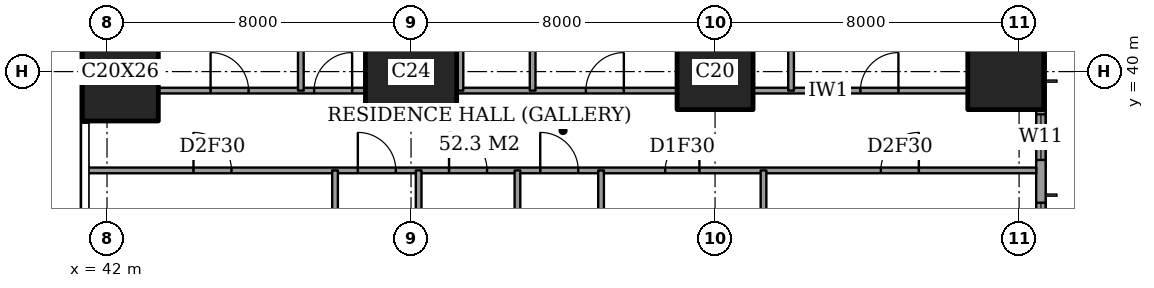
"""IFC4 building model, lengths in metres.
Left out: names, types, materials, properties, quantities, classifications, styles, units other than length and angle.
Written with IfcOpenShell. Run it as: python <this file> out.ifc"""

import sys

from ifc_helpers import new_model, si_unit, direction, frame, frame_2d, origin, origin_2d, place, context, subcontext, project, spatial, rectangle, extrude, element, fill, save


model = new_model("IFC4")
c1 = context("Model", 3, precision=1e-05, world=origin(), true_north=direction((0.0, 1.0)))
c2 = subcontext(c1, "Body", "Model", "MODEL_VIEW")
j1 = project(units=[si_unit("LENGTHUNIT", "METRE"), si_unit("PLANEANGLEUNIT", "RADIAN")], contexts=[c1])
p1 = place(None, origin())
s1 = spatial("IfcSite", under=j1, at=p1, CompositionType="ELEMENT")
p2 = place(p1, origin())
s2 = spatial("IfcBuilding", under=s1, at=p2, CompositionType="ELEMENT")
p3 = place(p2, frame((0.0, 0.0, 99.8)))
s3 = spatial("IfcBuildingStorey", under=s2, at=p3, CompositionType="ELEMENT", Elevation=99.8)
p4 = place(p3, frame((42.35, 40.0, 0.0), z_axis=(0.0, 0.0, 1.0), x_axis=(1.0, 0.0, 0.0)))
e1 = element("IfcColumn", 1, at=p4, inside=s3, PredefinedType="COLUMN", context=c2, shape_type="SweptSolid", body=[
    extrude(rectangle(XDim=2.0, YDim=2.6, at=origin_2d()), origin(), (0.0, 0.0, 1.0), 3.6),
])
p5 = place(p3, frame((50.0, 40.0, 0.0), z_axis=(0.0, 0.0, 1.0), x_axis=(1.0, 0.0, 0.0)))
e2 = element("IfcColumn", 2, at=p5, inside=s3, PredefinedType="COLUMN", context=c2, shape_type="SweptSolid", body=[
    extrude(rectangle(XDim=2.4, YDim=2.4, at=origin_2d()), origin(), (0.0, 0.0, 1.0), 3.6),
])
for number, where, z_axis, x_axis in (
    (3, (58.0, 40.0, 0.0), (0.0, 0.0, 1.0), (1.0, 0.0, 0.0)),
    (4, (65.65, 40.0, 0.0), (0.0, 0.0, 1.0), (1.0, 0.0, 0.0)),
):
    element("IfcColumn", number, at=place(p3, frame(where, z_axis=z_axis, x_axis=x_axis)), inside=s3, PredefinedType="COLUMN", context=c2, shape_type="SweptSolid", body=[
        extrude(rectangle(XDim=2.0, YDim=2.0, at=origin_2d()), origin(), (0.0, 0.0, 1.0), 3.6),
    ])
p6 = place(p3, frame((66.575, 3.175, 0.0), z_axis=(0.0, 0.0, 1.0), x_axis=(0.0, 1.0, 0.0)))
e5 = element("IfcWall", 5, at=p6, inside=s3, PredefinedType="SOLIDWALL", context=c2, shape_type="SweptSolid", body=[
    extrude(rectangle(XDim=41.65, YDim=0.25, at=frame_2d((20.825, 0.0))), origin(), (0.0, 0.0, 1.0), 3.6),
])
p7 = place(p6, frame((0.775, 0.0, 0.4)))
e6 = element("IfcOpeningElement", 6, at=p7, cuts=e5, PredefinedType="OPENING", context=c2, shape_type="SweptSolid", body=[
    extrude(rectangle(XDim=2.4, YDim=2.2, at=frame_2d((1.2, 1.1))), frame((0.0, 0.135, 0.0), z_axis=(0.0, -1.0, 0.0), x_axis=(1.0, 0.0, 0.0)), (0.0, 0.0, 1.0), 0.27),
])
p8 = place(p6, frame((6.1, 0.0, 0.4)))
e7 = element("IfcOpeningElement", 7, at=p8, cuts=e5, PredefinedType="OPENING", context=c2, shape_type="SweptSolid", body=[
    extrude(rectangle(XDim=1.2, YDim=2.2, at=frame_2d((0.6, 1.1))), frame((0.0, 0.135, 0.0), z_axis=(0.0, -1.0, 0.0), x_axis=(1.0, 0.0, 0.0)), (0.0, 0.0, 1.0), 0.27),
])
p9 = place(p6, frame((8.275, 0.0, 0.4)))
e8 = element("IfcOpeningElement", 8, at=p9, cuts=e5, PredefinedType="OPENING", context=c2, shape_type="SweptSolid", body=[
    extrude(rectangle(XDim=2.4, YDim=2.2, at=frame_2d((1.2, 1.1))), frame((0.0, 0.135, 0.0), z_axis=(0.0, -1.0, 0.0), x_axis=(1.0, 0.0, 0.0)), (0.0, 0.0, 1.0), 0.27),
])
p10 = place(p6, frame((15.775, 0.0, 0.4)))
e9 = element("IfcOpeningElement", 9, at=p10, cuts=e5, PredefinedType="OPENING", context=c2, shape_type="SweptSolid", body=[
    extrude(rectangle(XDim=2.4, YDim=2.2, at=frame_2d((1.2, 1.1))), frame((0.0, 0.135, 0.0), z_axis=(0.0, -1.0, 0.0), x_axis=(1.0, 0.0, 0.0)), (0.0, 0.0, 1.0), 0.27),
])
p11 = place(p6, frame((23.475, 0.0, 0.4)))
e10 = element("IfcOpeningElement", 10, at=p11, cuts=e5, PredefinedType="OPENING", context=c2, shape_type="SweptSolid", body=[
    extrude(rectangle(XDim=2.4, YDim=2.2, at=frame_2d((1.2, 1.1))), frame((0.0, 0.135, 0.0), z_axis=(0.0, -1.0, 0.0), x_axis=(1.0, 0.0, 0.0)), (0.0, 0.0, 1.0), 0.27),
])
p12 = place(p6, frame((30.975, 0.0, 0.4)))
e11 = element("IfcOpeningElement", 11, at=p12, cuts=e5, PredefinedType="OPENING", context=c2, shape_type="SweptSolid", body=[
    extrude(rectangle(XDim=2.4, YDim=2.2, at=frame_2d((1.2, 1.1))), frame((0.0, 0.135, 0.0), z_axis=(0.0, -1.0, 0.0), x_axis=(1.0, 0.0, 0.0)), (0.0, 0.0, 1.0), 0.27),
])
p13 = place(p6, frame((34.5, 0.0, 0.4)))
e12 = element("IfcOpeningElement", 12, at=p13, cuts=e5, PredefinedType="OPENING", context=c2, shape_type="SweptSolid", body=[
    extrude(rectangle(XDim=1.2, YDim=2.2, at=frame_2d((0.6, 1.1))), frame((0.0, 0.135, 0.0), z_axis=(0.0, -1.0, 0.0), x_axis=(1.0, 0.0, 0.0)), (0.0, 0.0, 1.0), 0.27),
])
p14 = place(p6, frame((38.475, 0.0, 0.4)))
e13 = element("IfcOpeningElement", 13, at=p14, cuts=e5, PredefinedType="OPENING", context=c2, shape_type="SweptSolid", body=[
    extrude(rectangle(XDim=2.4, YDim=2.2, at=frame_2d((1.2, 1.1))), frame((0.0, 0.135, 0.0), z_axis=(0.0, -1.0, 0.0), x_axis=(1.0, 0.0, 0.0)), (0.0, 0.0, 1.0), 0.27),
])
p15 = place(p3, frame((41.439, 37.4, 0.0), z_axis=(0.0, 0.0, 1.0), x_axis=(1.0, 0.0, 0.0)))
e14 = element("IfcWall", 14, at=p15, inside=s3, PredefinedType="PARTITIONING", context=c2, shape_type="SweptSolid", body=[
    extrude(rectangle(XDim=25.011, YDim=0.15, at=frame_2d((12.505, 0.0))), origin(), (0.0, 0.0, 1.0), 3.35),
])
p16 = place(p15, frame((11.961, 0.0, 0.0)))
e15 = element("IfcOpeningElement", 15, at=p16, cuts=e14, PredefinedType="OPENING", context=c2, shape_type="SweptSolid", body=[
    extrude(rectangle(XDim=1.0, YDim=2.1, at=frame_2d((0.5, 1.05))), frame((0.0, 0.085, 0.0), z_axis=(0.0, -1.0, 0.0), x_axis=(1.0, 0.0, 0.0)), (0.0, 0.0, 1.0), 0.17),
])
p17 = place(p15, frame((20.924, 0.0, 0.0)))
e16 = element("IfcOpeningElement", 16, at=p17, cuts=e14, PredefinedType="OPENING", context=c2, shape_type="SweptSolid", body=[
    extrude(rectangle(XDim=1.0, YDim=2.1, at=frame_2d((0.5, 1.05))), frame((0.0, 0.085, 0.0), z_axis=(0.0, -1.0, 0.0), x_axis=(1.0, 0.0, 0.0)), (0.0, 0.0, 1.0), 0.17),
])
p18 = place(p15, frame((15.249, 0.0, 0.0)))
e17 = element("IfcOpeningElement", 17, at=p18, cuts=e14, PredefinedType="OPENING", context=c2, shape_type="SweptSolid", body=[
    extrude(rectangle(XDim=0.9, YDim=2.1, at=frame_2d((0.45, 1.05))), frame((0.0, 0.085, 0.0), z_axis=(0.0, -1.0, 0.0), x_axis=(1.0, 0.0, 0.0)), (0.0, 0.0, 1.0), 0.17),
])
p19 = place(p15, frame((9.561, 0.0, 0.0)))
e18 = element("IfcOpeningElement", 18, at=p19, cuts=e14, PredefinedType="OPENING", context=c2, shape_type="SweptSolid", body=[
    extrude(rectangle(XDim=1.0, YDim=2.1, at=frame_2d((0.5, 1.05))), frame((0.0, 0.085, 0.0), z_axis=(0.0, -1.0, 0.0), x_axis=(1.0, 0.0, 0.0)), (0.0, 0.0, 1.0), 0.17),
])
p20 = place(p15, frame((7.161, 0.0, 0.0)))
e19 = element("IfcOpeningElement", 19, at=p20, cuts=e14, PredefinedType="OPENING", context=c2, shape_type="SweptSolid", body=[
    extrude(rectangle(XDim=1.0, YDim=2.1, at=frame_2d((0.5, 1.05))), frame((0.0, 0.085, 0.0), z_axis=(0.0, -1.0, 0.0), x_axis=(1.0, 0.0, 0.0)), (0.0, 0.0, 1.0), 0.17),
])
p21 = place(p15, frame((2.836, 0.0, 0.0)))
e20 = element("IfcOpeningElement", 20, at=p21, cuts=e14, PredefinedType="OPENING", context=c2, shape_type="SweptSolid", body=[
    extrude(rectangle(XDim=1.0, YDim=2.1, at=frame_2d((0.5, 1.05))), frame((0.0, 0.085, 0.0), z_axis=(0.0, -1.0, 0.0), x_axis=(1.0, 0.0, 0.0)), (0.0, 0.0, 1.0), 0.17),
])
p22 = place(p3, frame((43.35, 39.5, 0.0), z_axis=(0.0, 0.0, 1.0), x_axis=(1.0, 0.0, 0.0)))
e21 = element("IfcWall", 21, at=p22, inside=s3, PredefinedType="PARTITIONING", context=c2, shape_type="SweptSolid", body=[
    extrude(rectangle(XDim=5.45, YDim=0.15, at=frame_2d((2.725, 0.0))), origin(), (0.0, 0.0, 1.0), 3.35),
])
p23 = place(p22, frame((4.1, 0.0, 0.0)))
e22 = element("IfcOpeningElement", 22, at=p23, cuts=e21, PredefinedType="OPENING", context=c2, shape_type="SweptSolid", body=[
    extrude(rectangle(XDim=1.0, YDim=2.1, at=frame_2d((0.5, 1.05))), frame((0.0, 0.085, 0.0), z_axis=(0.0, -1.0, 0.0), x_axis=(1.0, 0.0, 0.0)), (0.0, 0.0, 1.0), 0.17),
])
p24 = place(p22, frame((1.375, 0.0, 0.0)))
e23 = element("IfcOpeningElement", 23, at=p24, cuts=e21, PredefinedType="OPENING", context=c2, shape_type="SweptSolid", body=[
    extrude(rectangle(XDim=1.0, YDim=2.1, at=frame_2d((0.5, 1.05))), frame((0.0, 0.085, 0.0), z_axis=(0.0, -1.0, 0.0), x_axis=(1.0, 0.0, 0.0)), (0.0, 0.0, 1.0), 0.17),
])
p25 = place(p3, frame((51.2, 39.5, 0.0), z_axis=(0.0, 0.0, 1.0), x_axis=(1.0, 0.0, 0.0)))
e24 = element("IfcWall", 24, at=p25, inside=s3, PredefinedType="PARTITIONING", context=c2, shape_type="SweptSolid", body=[
    extrude(rectangle(XDim=5.8, YDim=0.15, at=frame_2d((2.9, 0.0))), origin(), (0.0, 0.0, 1.0), 3.35),
])
p26 = place(p25, frame((3.4, 0.0, 0.0)))
e25 = element("IfcOpeningElement", 25, at=p26, cuts=e24, PredefinedType="OPENING", context=c2, shape_type="SweptSolid", body=[
    extrude(rectangle(XDim=1.0, YDim=2.1, at=frame_2d((0.5, 1.05))), frame((0.0, 0.085, 0.0), z_axis=(0.0, -1.0, 0.0), x_axis=(1.0, 0.0, 0.0)), (0.0, 0.0, 1.0), 0.17),
])
p27 = place(p3, frame((59.0, 39.5, 0.0), z_axis=(0.0, 0.0, 1.0), x_axis=(1.0, 0.0, 0.0)))
e26 = element("IfcWall", 26, at=p27, inside=s3, PredefinedType="PARTITIONING", context=c2, shape_type="SweptSolid", body=[
    extrude(rectangle(XDim=5.65, YDim=0.15, at=frame_2d((2.825, 0.0))), origin(), (0.0, 0.0, 1.0), 3.35),
])
p28 = place(p27, frame((2.825, 0.0, 0.0)))
e27 = element("IfcOpeningElement", 27, at=p28, cuts=e26, PredefinedType="OPENING", context=c2, shape_type="SweptSolid", body=[
    extrude(rectangle(XDim=1.0, YDim=2.1, at=frame_2d((0.5, 1.05))), frame((0.0, 0.085, 0.0), z_axis=(0.0, -1.0, 0.0), x_axis=(1.0, 0.0, 0.0)), (0.0, 0.0, 1.0), 0.17),
])
p29 = place(p3, frame((47.1, 39.5, 0.0), z_axis=(0.0, 0.0, 1.0), x_axis=(0.0, 1.0, 0.0)))
e28 = element("IfcWall", 28, at=p29, inside=s3, PredefinedType="PARTITIONING", context=c2, shape_type="SweptSolid", body=[
    extrude(rectangle(XDim=8.95, YDim=0.15, at=frame_2d((4.475, 0.0))), origin(), (0.0, 0.0, 1.0), 3.35),
])
p30 = place(p3, frame((48.0, 28.0, 0.0), z_axis=(0.0, 0.0, 1.0), x_axis=(0.0, 1.0, 0.0)))
e29 = element("IfcWall", 29, at=p30, inside=s3, PredefinedType="PARTITIONING", context=c2, shape_type="SweptSolid", body=[
    extrude(rectangle(XDim=9.4, YDim=0.15, at=frame_2d((4.7, 0.0))), origin(), (0.0, 0.0, 1.0), 3.35),
])
p31 = place(p30, frame((0.5, 0.0, 0.0)))
e30 = element("IfcOpeningElement", 30, at=p31, cuts=e29, PredefinedType="OPENING", context=c2, shape_type="SweptSolid", body=[
    extrude(rectangle(XDim=1.0, YDim=2.1, at=frame_2d((0.5, 1.05))), frame((0.0, 0.085, 0.0), z_axis=(0.0, -1.0, 0.0), x_axis=(1.0, 0.0, 0.0)), (0.0, 0.0, 1.0), 0.17),
])
p32 = place(p3, frame((50.2, 33.2, 0.0), z_axis=(0.0, 0.0, 1.0), x_axis=(0.0, 1.0, 0.0)))
e31 = element("IfcWall", 31, at=p32, inside=s3, PredefinedType="PARTITIONING", context=c2, shape_type="SweptSolid", body=[
    extrude(rectangle(XDim=4.2, YDim=0.15, at=frame_2d((2.1, 0.0))), origin(), (0.0, 0.0, 1.0), 3.35),
])
p33 = place(p3, frame((51.3, 39.5, 0.0), z_axis=(0.0, 0.0, 1.0), x_axis=(0.0, 1.0, 0.0)))
e32 = element("IfcWall", 32, at=p33, inside=s3, PredefinedType="PARTITIONING", context=c2, shape_type="SweptSolid", body=[
    extrude(rectangle(XDim=8.95, YDim=0.15, at=frame_2d((4.475, 0.0))), origin(), (0.0, 0.0, 1.0), 3.35),
])
p34 = place(p33, frame((4.025, 0.0, 0.0)))
e33 = element("IfcOpeningElement", 33, at=p34, cuts=e32, PredefinedType="OPENING", context=c2, shape_type="SweptSolid", body=[
    extrude(rectangle(XDim=0.9, YDim=2.1, at=frame_2d((0.45, 1.05))), frame((0.0, 0.085, 0.0), z_axis=(0.0, -1.0, 0.0), x_axis=(1.0, 0.0, 0.0)), (0.0, 0.0, 1.0), 0.17),
])
p35 = place(p3, frame((52.8, 30.0, 0.0), z_axis=(0.0, 0.0, 1.0), x_axis=(0.0, 1.0, 0.0)))
e34 = element("IfcWall", 34, at=p35, inside=s3, PredefinedType="PARTITIONING", context=c2, shape_type="SweptSolid", body=[
    extrude(rectangle(XDim=7.4, YDim=0.15, at=frame_2d((3.7, 0.0))), origin(), (0.0, 0.0, 1.0), 3.35),
])
p36 = place(p3, frame((53.2, 39.5, 0.0), z_axis=(0.0, 0.0, 1.0), x_axis=(0.0, 1.0, 0.0)))
e35 = element("IfcWall", 35, at=p36, inside=s3, PredefinedType="PARTITIONING", context=c2, shape_type="SweptSolid", body=[
    extrude(rectangle(XDim=8.95, YDim=0.15, at=frame_2d((4.475, 0.0))), origin(), (0.0, 0.0, 1.0), 3.35),
])
p37 = place(p3, frame((55.0, 28.0, 0.0), z_axis=(0.0, 0.0, 1.0), x_axis=(0.0, 1.0, 0.0)))
e36 = element("IfcWall", 36, at=p37, inside=s3, PredefinedType="PARTITIONING", context=c2, shape_type="SweptSolid", body=[
    extrude(rectangle(XDim=9.4, YDim=0.15, at=frame_2d((4.7, 0.0))), origin(), (0.0, 0.0, 1.0), 3.35),
])
p38 = place(p37, frame((0.5, 0.0, 0.0)))
e37 = element("IfcOpeningElement", 37, at=p38, cuts=e36, PredefinedType="OPENING", context=c2, shape_type="SweptSolid", body=[
    extrude(rectangle(XDim=1.0, YDim=2.1, at=frame_2d((0.5, 1.05))), frame((0.0, 0.085, 0.0), z_axis=(0.0, -1.0, 0.0), x_axis=(1.0, 0.0, 0.0)), (0.0, 0.0, 1.0), 0.17),
])
p39 = place(p3, frame((59.275, 33.2, 0.0), z_axis=(0.0, 0.0, 1.0), x_axis=(0.0, 1.0, 0.0)))
e38 = element("IfcWall", 38, at=p39, inside=s3, PredefinedType="PARTITIONING", context=c2, shape_type="SweptSolid", body=[
    extrude(rectangle(XDim=4.2, YDim=0.15, at=frame_2d((2.1, 0.0))), origin(), (0.0, 0.0, 1.0), 3.35),
])
p40 = place(p3, frame((60.0, 39.5, 0.0), z_axis=(0.0, 0.0, 1.0), x_axis=(0.0, 1.0, 0.0)))
e39 = element("IfcWall", 39, at=p40, inside=s3, PredefinedType="PARTITIONING", context=c2, shape_type="SweptSolid", body=[
    extrude(rectangle(XDim=8.95, YDim=0.15, at=frame_2d((4.475, 0.0))), origin(), (0.0, 0.0, 1.0), 3.35),
])
p41 = place(p12, origin())
e40 = element("IfcWindow", 40, at=p41, inside=s3, PartitioningType="SINGLE_PANEL", PredefinedType="WINDOW", context=c2, shape_type="SweptSolid", body=[
    extrude(rectangle(XDim=2.4, YDim=2.2, at=frame_2d((1.2, 1.1))), frame((0.0, 0.03, 0.0), z_axis=(0.0, -1.0, 0.0), x_axis=(1.0, 0.0, 0.0)), (0.0, 0.0, 1.0), 0.06),
])
fill(e11, e40)
p42 = place(p13, origin())
e41 = element("IfcWindow", 41, at=p42, inside=s3, PartitioningType="SINGLE_PANEL", PredefinedType="WINDOW", context=c2, shape_type="SweptSolid", body=[
    extrude(rectangle(XDim=1.2, YDim=2.2, at=frame_2d((0.6, 1.1))), frame((0.0, 0.03, 0.0), z_axis=(0.0, -1.0, 0.0), x_axis=(1.0, 0.0, 0.0)), (0.0, 0.0, 1.0), 0.06),
])
fill(e12, e41)
p43 = place(p28, origin())
e42 = element("IfcDoor", 42, at=p43, inside=s3, OperationType="SINGLE_SWING_LEFT", PredefinedType="DOOR", context=c2, shape_type="SweptSolid", body=[
    extrude(rectangle(XDim=1.0, YDim=2.1, at=frame_2d((0.5, 1.05))), frame((0.0, 0.025, 0.0), z_axis=(0.0, -1.0, 0.0), x_axis=(1.0, 0.0, 0.0)), (0.0, 0.0, 1.0), 0.05),
])
fill(e27, e42)
p44 = place(p26, origin())
e43 = element("IfcDoor", 43, at=p44, inside=s3, OperationType="SINGLE_SWING_LEFT", PredefinedType="DOOR", context=c2, shape_type="SweptSolid", body=[
    extrude(rectangle(XDim=1.0, YDim=2.1, at=frame_2d((0.5, 1.05))), frame((0.0, 0.025, 0.0), z_axis=(0.0, -1.0, 0.0), x_axis=(1.0, 0.0, 0.0)), (0.0, 0.0, 1.0), 0.05),
])
fill(e25, e43)
p45 = place(p23, origin())
e44 = element("IfcDoor", 44, at=p45, inside=s3, OperationType="SINGLE_SWING_LEFT", PredefinedType="DOOR", context=c2, shape_type="SweptSolid", body=[
    extrude(rectangle(XDim=1.0, YDim=2.1, at=frame_2d((0.5, 1.05))), frame((0.0, 0.025, 0.0), z_axis=(0.0, -1.0, 0.0), x_axis=(1.0, 0.0, 0.0)), (0.0, 0.0, 1.0), 0.05),
])
fill(e22, e44)
p46 = place(p24, origin())
e45 = element("IfcDoor", 45, at=p46, inside=s3, OperationType="SINGLE_SWING_RIGHT", PredefinedType="DOOR", context=c2, shape_type="SweptSolid", body=[
    extrude(rectangle(XDim=1.0, YDim=2.1, at=frame_2d((0.5, 1.05))), frame((0.0, 0.025, 0.0), z_axis=(0.0, -1.0, 0.0), x_axis=(1.0, 0.0, 0.0)), (0.0, 0.0, 1.0), 0.05),
])
fill(e23, e45)
p47 = place(p16, origin())
e46 = element("IfcDoor", 46, at=p47, inside=s3, OperationType="SINGLE_SWING_RIGHT", PredefinedType="DOOR", context=c2, shape_type="SweptSolid", body=[
    extrude(rectangle(XDim=1.0, YDim=2.1, at=frame_2d((0.5, 1.05))), frame((0.0, 0.025, 0.0), z_axis=(0.0, -1.0, 0.0), x_axis=(1.0, 0.0, 0.0)), (0.0, 0.0, 1.0), 0.05),
])
fill(e15, e46)
p48 = place(p17, origin())
e47 = element("IfcDoor", 47, at=p48, inside=s3, OperationType="SINGLE_SWING_LEFT", PredefinedType="DOOR", context=c2, shape_type="SweptSolid", body=[
    extrude(rectangle(XDim=1.0, YDim=2.1, at=frame_2d((0.5, 1.05))), frame((0.0, 0.025, 0.0), z_axis=(0.0, -1.0, 0.0), x_axis=(1.0, 0.0, 0.0)), (0.0, 0.0, 1.0), 0.05),
])
fill(e16, e47)
p49 = place(p18, origin())
e48 = element("IfcDoor", 48, at=p49, inside=s3, OperationType="SINGLE_SWING_LEFT", PredefinedType="DOOR", context=c2, shape_type="SweptSolid", body=[
    extrude(rectangle(XDim=0.9, YDim=2.1, at=frame_2d((0.45, 1.05))), frame((0.0, 0.025, 0.0), z_axis=(0.0, -1.0, 0.0), x_axis=(1.0, 0.0, 0.0)), (0.0, 0.0, 1.0), 0.05),
])
fill(e17, e48)
p50 = place(p19, origin())
e49 = element("IfcDoor", 49, at=p50, inside=s3, OperationType="SINGLE_SWING_RIGHT", PredefinedType="DOOR", context=c2, shape_type="SweptSolid", body=[
    extrude(rectangle(XDim=1.0, YDim=2.1, at=frame_2d((0.5, 1.05))), frame((0.0, 0.025, 0.0), z_axis=(0.0, -1.0, 0.0), x_axis=(1.0, 0.0, 0.0)), (0.0, 0.0, 1.0), 0.05),
])
fill(e18, e49)
p51 = place(p20, origin())
e50 = element("IfcDoor", 50, at=p51, inside=s3, OperationType="SINGLE_SWING_RIGHT", PredefinedType="DOOR", context=c2, shape_type="SweptSolid", body=[
    extrude(rectangle(XDim=1.0, YDim=2.1, at=frame_2d((0.5, 1.05))), frame((0.0, 0.025, 0.0), z_axis=(0.0, -1.0, 0.0), x_axis=(1.0, 0.0, 0.0)), (0.0, 0.0, 1.0), 0.05),
])
fill(e19, e50)
p52 = place(p21, origin())
e51 = element("IfcDoor", 51, at=p52, inside=s3, OperationType="SINGLE_SWING_RIGHT", PredefinedType="DOOR", context=c2, shape_type="SweptSolid", body=[
    extrude(rectangle(XDim=1.0, YDim=2.1, at=frame_2d((0.5, 1.05))), frame((0.0, 0.025, 0.0), z_axis=(0.0, -1.0, 0.0), x_axis=(1.0, 0.0, 0.0)), (0.0, 0.0, 1.0), 0.05),
])
fill(e20, e51)
save(model, sys.argv[1])
